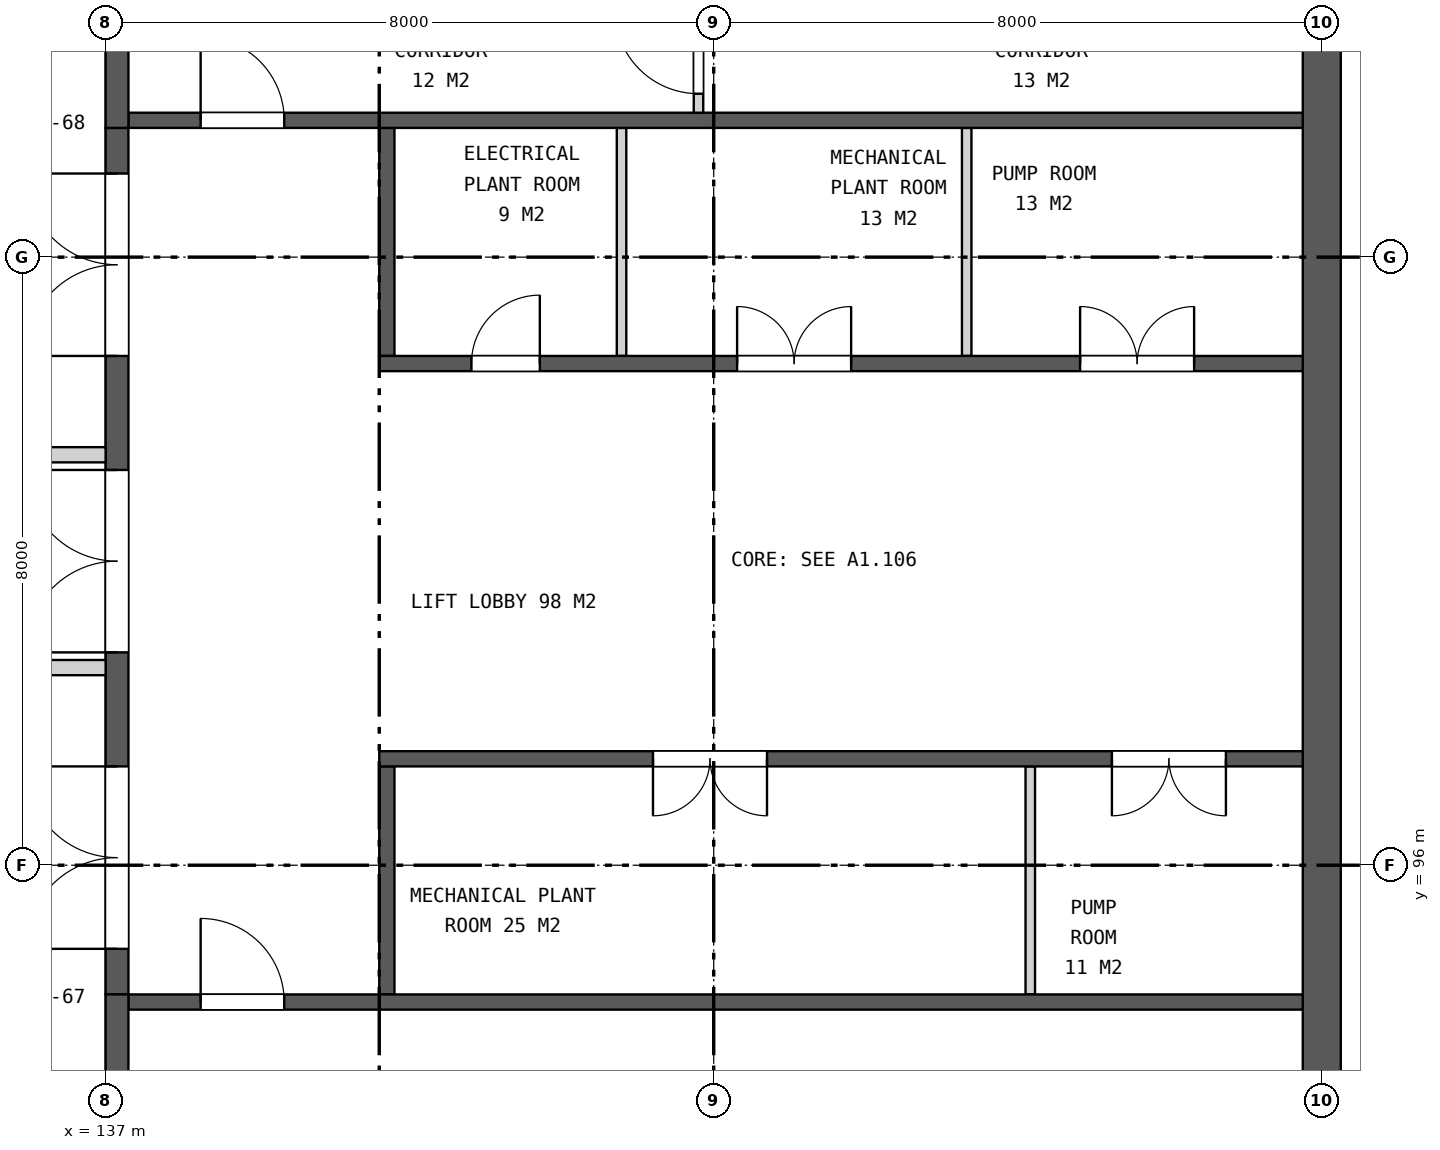
"""IFC4 building model, lengths in metres.
Left out: names, types, materials, properties, quantities, classifications, styles, units other than length and angle.
Written with IfcOpenShell. Run it as: python <this file> out.ifc"""

import sys

from ifc_helpers import new_model, si_unit, direction, frame, frame_2d, origin, place, context, subcontext, project, spatial, rectangle, extrude, element, fill, save


model = new_model("IFC4")
c1 = context("Model", 3, precision=1e-05, world=origin(), true_north=direction((0.0, 1.0)))
c2 = subcontext(c1, "Body", "Model", "MODEL_VIEW")
j1 = project(units=[si_unit("LENGTHUNIT", "METRE"), si_unit("PLANEANGLEUNIT", "RADIAN")], contexts=[c1])
p1 = place(None, origin())
s1 = spatial("IfcSite", under=j1, at=p1, CompositionType="ELEMENT")
p2 = place(p1, origin())
s2 = spatial("IfcBuilding", under=s1, at=p2, CompositionType="ELEMENT")
p3 = place(p2, frame((0.0, 0.0, 303.9)))
s3 = spatial("IfcBuildingStorey", under=s2, at=p3, CompositionType="ELEMENT", Elevation=303.9)
p4 = place(p3, frame((153.0, 88.25, 0.0), z_axis=(0.0, 0.0, 1.0), x_axis=(0.0, 1.0, 0.0)))
e1 = element("IfcWall", 1, at=p4, inside=s3, PredefinedType="SHEAR", context=c2, shape_type="SweptSolid", body=[
    extrude(rectangle(XDim=23.5, YDim=0.5, at=frame_2d((11.75, 0.0))), origin(), (0.0, 0.0, 1.0), 7.4),
])
p5 = place(p3, frame((137.15, 94.3, 0.0), z_axis=(0.0, 0.0, 1.0), x_axis=(0.0, 1.0, 0.0)))
e2 = element("IfcWall", 2, at=p5, inside=s3, PredefinedType="SHEAR", context=c2, shape_type="SweptSolid", body=[
    extrude(rectangle(XDim=11.4, YDim=0.3, at=frame_2d((5.7, 0.0))), origin(), (0.0, 0.0, 1.0), 7.4),
])
p6 = place(p5, frame((0.6, 0.0, 0.0)))
e3 = element("IfcOpeningElement", 3, at=p6, cuts=e2, PredefinedType="OPENING", context=c2, shape_type="SweptSolid", body=[
    extrude(rectangle(XDim=2.4, YDim=2.4, at=frame_2d((1.2, 1.2))), frame((0.0, 0.16, 0.0), z_axis=(0.0, -1.0, 0.0), x_axis=(1.0, 0.0, 0.0)), (0.0, 0.0, 1.0), 0.32),
])
p7 = place(p5, frame((4.5, 0.0, 0.0)))
e4 = element("IfcOpeningElement", 4, at=p7, cuts=e2, PredefinedType="OPENING", context=c2, shape_type="SweptSolid", body=[
    extrude(rectangle(XDim=2.4, YDim=2.4, at=frame_2d((1.2, 1.2))), frame((0.0, 0.16, 0.0), z_axis=(0.0, -1.0, 0.0), x_axis=(1.0, 0.0, 0.0)), (0.0, 0.0, 1.0), 0.32),
])
p8 = place(p5, frame((8.4, 0.0, 0.0)))
e5 = element("IfcOpeningElement", 5, at=p8, cuts=e2, PredefinedType="OPENING", context=c2, shape_type="SweptSolid", body=[
    extrude(rectangle(XDim=2.4, YDim=2.4, at=frame_2d((1.2, 1.2))), frame((0.0, 0.16, 0.0), z_axis=(0.0, -1.0, 0.0), x_axis=(1.0, 0.0, 0.0)), (0.0, 0.0, 1.0), 0.32),
])
p9 = place(p3, frame((140.7, 102.7, 0.0), z_axis=(0.0, 0.0, 1.0), x_axis=(0.0, 1.0, 0.0)))
e6 = element("IfcWall", 6, at=p9, inside=s3, PredefinedType="SHEAR", context=c2, shape_type="SweptSolid", body=[
    extrude(rectangle(XDim=3.0, YDim=0.2, at=frame_2d((1.5, 0.0))), origin(), (0.0, 0.0, 1.0), 7.4),
])
for number, where, z_axis, x_axis in (
    (7, (143.788, 102.7, 0.0), (0.0, 0.0, 1.0), (0.0, 1.0, 0.0)),
    (8, (148.329, 102.7, 0.0), (0.0, 0.0, 1.0), (0.0, 1.0, 0.0)),
):
    element("IfcWall", number, at=place(p3, frame(where, z_axis=z_axis, x_axis=x_axis)), inside=s3, PredefinedType="PARTITIONING", context=c2, shape_type="SweptSolid", body=[
        extrude(rectangle(XDim=3.0, YDim=0.125, at=frame_2d((1.5, 0.0))), origin(), (0.0, 0.0, 1.0), 7.4),
    ])
p10 = place(p3, frame((140.6, 102.6, 0.0), z_axis=(0.0, 0.0, 1.0), x_axis=(1.0, 0.0, 0.0)))
e9 = element("IfcWall", 9, at=p10, inside=s3, PredefinedType="SHEAR", context=c2, shape_type="SweptSolid", body=[
    extrude(rectangle(XDim=12.15, YDim=0.2, at=frame_2d((6.075, 0.0))), origin(), (0.0, 0.0, 1.0), 7.4),
])
p11 = place(p10, frame((1.212, 0.0, 0.0)))
e10 = element("IfcOpeningElement", 10, at=p11, cuts=e9, PredefinedType="OPENING", context=c2, shape_type="SweptSolid", body=[
    extrude(rectangle(XDim=0.9, YDim=2.1, at=frame_2d((0.45, 1.05))), frame((0.0, 0.11, 0.0), z_axis=(0.0, -1.0, 0.0), x_axis=(1.0, 0.0, 0.0)), (0.0, 0.0, 1.0), 0.22),
])
p12 = place(p10, frame((4.708, 0.0, 0.0)))
e11 = element("IfcOpeningElement", 11, at=p12, cuts=e9, PredefinedType="OPENING", context=c2, shape_type="SweptSolid", body=[
    extrude(rectangle(XDim=1.5, YDim=2.1, at=frame_2d((0.75, 1.05))), frame((0.0, 0.11, 0.0), z_axis=(0.0, -1.0, 0.0), x_axis=(1.0, 0.0, 0.0)), (0.0, 0.0, 1.0), 0.22),
])
p13 = place(p10, frame((9.22, 0.0, 0.0)))
e12 = element("IfcOpeningElement", 12, at=p13, cuts=e9, PredefinedType="OPENING", context=c2, shape_type="SweptSolid", body=[
    extrude(rectangle(XDim=1.5, YDim=2.1, at=frame_2d((0.75, 1.05))), frame((0.0, 0.11, 0.0), z_axis=(0.0, -1.0, 0.0), x_axis=(1.0, 0.0, 0.0)), (0.0, 0.0, 1.0), 0.22),
])
p14 = place(p3, frame((140.7, 94.3, 0.0), z_axis=(0.0, 0.0, 1.0), x_axis=(0.0, 1.0, 0.0)))
e13 = element("IfcWall", 13, at=p14, inside=s3, PredefinedType="SHEAR", context=c2, shape_type="SweptSolid", body=[
    extrude(rectangle(XDim=3.0, YDim=0.2, at=frame_2d((1.5, 0.0))), origin(), (0.0, 0.0, 1.0), 7.4),
])
p15 = place(p3, frame((149.165, 94.3, 0.0), z_axis=(0.0, 0.0, 1.0), x_axis=(0.0, 1.0, 0.0)))
e14 = element("IfcWall", 14, at=p15, inside=s3, PredefinedType="PARTITIONING", context=c2, shape_type="SweptSolid", body=[
    extrude(rectangle(XDim=3.0, YDim=0.125, at=frame_2d((1.5, 0.0))), origin(), (0.0, 0.0, 1.0), 7.4),
])
p16 = place(p3, frame((140.6, 97.4, 0.0), z_axis=(0.0, 0.0, 1.0), x_axis=(1.0, 0.0, 0.0)))
e15 = element("IfcWall", 15, at=p16, inside=s3, PredefinedType="SHEAR", context=c2, shape_type="SweptSolid", body=[
    extrude(rectangle(XDim=12.15, YDim=0.2, at=frame_2d((6.075, 0.0))), origin(), (0.0, 0.0, 1.0), 7.4),
])
p17 = place(p16, frame((3.601, 0.0, 0.0)))
e16 = element("IfcOpeningElement", 16, at=p17, cuts=e15, PredefinedType="OPENING", context=c2, shape_type="SweptSolid", body=[
    extrude(rectangle(XDim=1.5, YDim=2.1, at=frame_2d((0.75, 1.05))), frame((0.0, 0.11, 0.0), z_axis=(0.0, -1.0, 0.0), x_axis=(1.0, 0.0, 0.0)), (0.0, 0.0, 1.0), 0.22),
])
p18 = place(p16, frame((9.639, 0.0, 0.0)))
e17 = element("IfcOpeningElement", 17, at=p18, cuts=e15, PredefinedType="OPENING", context=c2, shape_type="SweptSolid", body=[
    extrude(rectangle(XDim=1.5, YDim=2.1, at=frame_2d((0.75, 1.05))), frame((0.0, 0.11, 0.0), z_axis=(0.0, -1.0, 0.0), x_axis=(1.0, 0.0, 0.0)), (0.0, 0.0, 1.0), 0.22),
])
p19 = place(p3, frame((137.3, 105.8, 0.0), z_axis=(0.0, 0.0, 1.0), x_axis=(1.0, 0.0, 0.0)))
e18 = element("IfcWall", 18, at=p19, inside=s3, PredefinedType="SHEAR", context=c2, shape_type="SweptSolid", body=[
    extrude(rectangle(XDim=15.45, YDim=0.2, at=frame_2d((7.725, 0.0))), origin(), (0.0, 0.0, 1.0), 7.4),
])
p20 = place(p19, frame((0.95, 0.0, 0.0)))
e19 = element("IfcOpeningElement", 19, at=p20, cuts=e18, PredefinedType="OPENING", context=c2, shape_type="SweptSolid", body=[
    extrude(rectangle(XDim=1.1, YDim=2.1, at=frame_2d((0.55, 1.05))), frame((0.0, 0.11, 0.0), z_axis=(0.0, -1.0, 0.0), x_axis=(1.0, 0.0, 0.0)), (0.0, 0.0, 1.0), 0.22),
])
p21 = place(p3, frame((137.15, 105.7, 0.0), z_axis=(0.0, 0.0, 1.0), x_axis=(0.0, 1.0, 0.0)))
e20 = element("IfcWall", 20, at=p21, inside=s3, PredefinedType="SHEAR", context=c2, shape_type="SweptSolid", body=[
    extrude(rectangle(XDim=6.05, YDim=0.3, at=frame_2d((3.025, 0.0))), origin(), (0.0, 0.0, 1.0), 7.4),
])
p22 = place(p3, frame((144.8, 105.9, 0.0), z_axis=(0.0, 0.0, 1.0), x_axis=(0.0, 1.0, 0.0)))
e21 = element("IfcWall", 21, at=p22, inside=s3, PredefinedType="PARTITIONING", context=c2, shape_type="SweptSolid", body=[
    extrude(rectangle(XDim=1.6, YDim=0.125, at=frame_2d((0.8, 0.0))), origin(), (0.0, 0.0, 1.0), 7.4),
])
p23 = place(p22, frame((0.25, 0.0, 0.0)))
e22 = element("IfcOpeningElement", 22, at=p23, cuts=e21, PredefinedType="OPENING", context=c2, shape_type="SweptSolid", body=[
    extrude(rectangle(XDim=1.1, YDim=2.1, at=frame_2d((0.55, 1.05))), frame((0.0, 0.073, 0.0), z_axis=(0.0, -1.0, 0.0), x_axis=(1.0, 0.0, 0.0)), (0.0, 0.0, 1.0), 0.145),
])
p24 = place(p3, frame((137.3, 94.2, 0.0), z_axis=(0.0, 0.0, 1.0), x_axis=(1.0, 0.0, 0.0)))
e23 = element("IfcWall", 23, at=p24, inside=s3, PredefinedType="SHEAR", context=c2, shape_type="SweptSolid", body=[
    extrude(rectangle(XDim=15.45, YDim=0.2, at=frame_2d((7.725, 0.0))), origin(), (0.0, 0.0, 1.0), 7.4),
])
p25 = place(p24, frame((0.95, 0.0, 0.0)))
e24 = element("IfcOpeningElement", 24, at=p25, cuts=e23, PredefinedType="OPENING", context=c2, shape_type="SweptSolid", body=[
    extrude(rectangle(XDim=1.1, YDim=2.1, at=frame_2d((0.55, 1.05))), frame((0.0, 0.11, 0.0), z_axis=(0.0, -1.0, 0.0), x_axis=(1.0, 0.0, 0.0)), (0.0, 0.0, 1.0), 0.22),
])
p26 = place(p3, frame((137.15, 88.25, 0.0), z_axis=(0.0, 0.0, 1.0), x_axis=(0.0, 1.0, 0.0)))
e25 = element("IfcWall", 25, at=p26, inside=s3, PredefinedType="SHEAR", context=c2, shape_type="SweptSolid", body=[
    extrude(rectangle(XDim=6.05, YDim=0.3, at=frame_2d((3.025, 0.0))), origin(), (0.0, 0.0, 1.0), 7.4),
])
p27 = place(p3, frame((129.1, 98.6, 0.0), z_axis=(0.0, 0.0, 1.0), x_axis=(1.0, 0.0, 0.0)))
e26 = element("IfcWall", 26, at=p27, inside=s3, PredefinedType="SOLIDWALL", context=c2, shape_type="SweptSolid", body=[
    extrude(rectangle(XDim=7.9, YDim=0.2, at=frame_2d((3.95, 0.0))), origin(), (0.0, 0.0, 1.0), 6.643),
])
p28 = place(p27, frame((2.65, 0.0, 0.0)))
e27 = element("IfcOpeningElement", 27, at=p28, cuts=e26, PredefinedType="OPENING", context=c2, shape_type="SweptSolid", body=[
    extrude(rectangle(XDim=1.0, YDim=2.1, at=frame_2d((0.5, 1.05))), frame((0.0, 0.11, 0.0), z_axis=(0.0, -1.0, 0.0), x_axis=(1.0, 0.0, 0.0)), (0.0, 0.0, 1.0), 0.22),
])
p29 = place(p3, frame((129.1, 101.4, 0.0), z_axis=(0.0, 0.0, 1.0), x_axis=(1.0, 0.0, 0.0)))
e28 = element("IfcWall", 28, at=p29, inside=s3, PredefinedType="SOLIDWALL", context=c2, shape_type="SweptSolid", body=[
    extrude(rectangle(XDim=7.9, YDim=0.2, at=frame_2d((3.95, 0.0))), origin(), (0.0, 0.0, 1.0), 6.643),
])
p30 = place(p29, frame((2.65, 0.0, 0.0)))
e29 = element("IfcOpeningElement", 29, at=p30, cuts=e28, PredefinedType="OPENING", context=c2, shape_type="SweptSolid", body=[
    extrude(rectangle(XDim=1.0, YDim=2.1, at=frame_2d((0.5, 1.05))), frame((0.0, 0.11, 0.0), z_axis=(0.0, -1.0, 0.0), x_axis=(1.0, 0.0, 0.0)), (0.0, 0.0, 1.0), 0.22),
])
p31 = place(p6, origin())
e30 = element("IfcDoor", 30, at=p31, inside=s3, OperationType="DOUBLE_DOOR_SINGLE_SWING", PredefinedType="DOOR", context=c2, shape_type="SweptSolid", body=[
    extrude(rectangle(XDim=2.4, YDim=2.4, at=frame_2d((1.2, 1.2))), frame((0.0, 0.025, 0.0), z_axis=(0.0, -1.0, 0.0), x_axis=(1.0, 0.0, 0.0)), (0.0, 0.0, 1.0), 0.05),
])
fill(e3, e30)
p32 = place(p7, origin())
e31 = element("IfcDoor", 31, at=p32, inside=s3, OperationType="DOUBLE_DOOR_SINGLE_SWING", PredefinedType="DOOR", context=c2, shape_type="SweptSolid", body=[
    extrude(rectangle(XDim=2.4, YDim=2.4, at=frame_2d((1.2, 1.2))), frame((0.0, 0.025, 0.0), z_axis=(0.0, -1.0, 0.0), x_axis=(1.0, 0.0, 0.0)), (0.0, 0.0, 1.0), 0.05),
])
fill(e4, e31)
p33 = place(p8, origin())
e32 = element("IfcDoor", 32, at=p33, inside=s3, OperationType="DOUBLE_DOOR_SINGLE_SWING", PredefinedType="DOOR", context=c2, shape_type="SweptSolid", body=[
    extrude(rectangle(XDim=2.4, YDim=2.4, at=frame_2d((1.2, 1.2))), frame((0.0, 0.025, 0.0), z_axis=(0.0, -1.0, 0.0), x_axis=(1.0, 0.0, 0.0)), (0.0, 0.0, 1.0), 0.05),
])
fill(e5, e32)
p34 = place(p11, origin())
e33 = element("IfcDoor", 33, at=p34, inside=s3, OperationType="SINGLE_SWING_RIGHT", PredefinedType="DOOR", context=c2, shape_type="SweptSolid", body=[
    extrude(rectangle(XDim=0.9, YDim=2.1, at=frame_2d((0.45, 1.05))), frame((0.0, 0.025, 0.0), z_axis=(0.0, -1.0, 0.0), x_axis=(1.0, 0.0, 0.0)), (0.0, 0.0, 1.0), 0.05),
])
fill(e10, e33)
p35 = place(p12, origin())
e34 = element("IfcDoor", 34, at=p35, inside=s3, OperationType="DOUBLE_DOOR_SINGLE_SWING", PredefinedType="DOOR", context=c2, shape_type="SweptSolid", body=[
    extrude(rectangle(XDim=1.5, YDim=2.1, at=frame_2d((0.75, 1.05))), frame((0.0, 0.025, 0.0), z_axis=(0.0, -1.0, 0.0), x_axis=(1.0, 0.0, 0.0)), (0.0, 0.0, 1.0), 0.05),
])
fill(e11, e34)
p36 = place(p13, origin())
e35 = element("IfcDoor", 35, at=p36, inside=s3, OperationType="DOUBLE_DOOR_SINGLE_SWING", PredefinedType="DOOR", context=c2, shape_type="SweptSolid", body=[
    extrude(rectangle(XDim=1.5, YDim=2.1, at=frame_2d((0.75, 1.05))), frame((0.0, 0.025, 0.0), z_axis=(0.0, -1.0, 0.0), x_axis=(1.0, 0.0, 0.0)), (0.0, 0.0, 1.0), 0.05),
])
fill(e12, e35)
p37 = place(p17, frame((1.5, 0.0, 0.0), z_axis=(0.0, 0.0, 1.0), x_axis=(-1.0, 0.0, 0.0)))
e36 = element("IfcDoor", 36, at=p37, inside=s3, OperationType="DOUBLE_DOOR_SINGLE_SWING", PredefinedType="DOOR", context=c2, shape_type="SweptSolid", body=[
    extrude(rectangle(XDim=1.5, YDim=2.1, at=frame_2d((0.75, 1.05))), frame((0.0, 0.025, 0.0), z_axis=(0.0, -1.0, 0.0), x_axis=(1.0, 0.0, 0.0)), (0.0, 0.0, 1.0), 0.05),
])
fill(e16, e36)
p38 = place(p18, frame((1.5, 0.0, 0.0), z_axis=(0.0, 0.0, 1.0), x_axis=(-1.0, 0.0, 0.0)))
e37 = element("IfcDoor", 37, at=p38, inside=s3, OperationType="DOUBLE_DOOR_SINGLE_SWING", PredefinedType="DOOR", context=c2, shape_type="SweptSolid", body=[
    extrude(rectangle(XDim=1.5, YDim=2.1, at=frame_2d((0.75, 1.05))), frame((0.0, 0.025, 0.0), z_axis=(0.0, -1.0, 0.0), x_axis=(1.0, 0.0, 0.0)), (0.0, 0.0, 1.0), 0.05),
])
fill(e17, e37)
p39 = place(p20, origin())
e38 = element("IfcDoor", 38, at=p39, inside=s3, OperationType="SINGLE_SWING_LEFT", PredefinedType="DOOR", context=c2, shape_type="SweptSolid", body=[
    extrude(rectangle(XDim=1.1, YDim=2.1, at=frame_2d((0.55, 1.05))), frame((0.0, 0.025, 0.0), z_axis=(0.0, -1.0, 0.0), x_axis=(1.0, 0.0, 0.0)), (0.0, 0.0, 1.0), 0.05),
])
fill(e19, e38)
p40 = place(p23, origin())
e39 = element("IfcDoor", 39, at=p40, inside=s3, OperationType="SINGLE_SWING_RIGHT", PredefinedType="DOOR", context=c2, shape_type="SweptSolid", body=[
    extrude(rectangle(XDim=1.1, YDim=2.1, at=frame_2d((0.55, 1.05))), frame((0.0, 0.025, 0.0), z_axis=(0.0, -1.0, 0.0), x_axis=(1.0, 0.0, 0.0)), (0.0, 0.0, 1.0), 0.05),
])
fill(e22, e39)
p41 = place(p25, origin())
e40 = element("IfcDoor", 40, at=p41, inside=s3, OperationType="SINGLE_SWING_LEFT", PredefinedType="DOOR", context=c2, shape_type="SweptSolid", body=[
    extrude(rectangle(XDim=1.1, YDim=2.1, at=frame_2d((0.55, 1.05))), frame((0.0, 0.025, 0.0), z_axis=(0.0, -1.0, 0.0), x_axis=(1.0, 0.0, 0.0)), (0.0, 0.0, 1.0), 0.05),
])
fill(e24, e40)
save(model, sys.argv[1])
